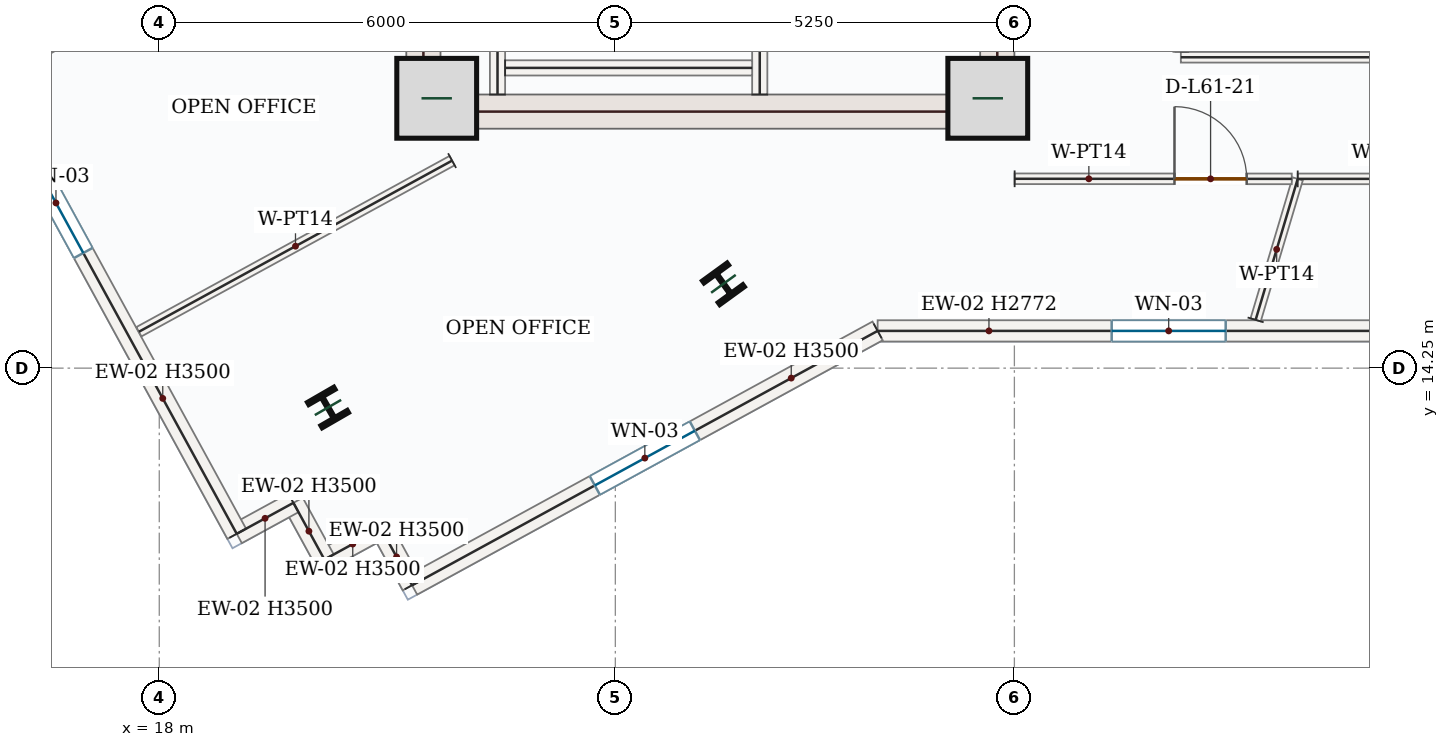
"""IFC4 building model, lengths in metres.
Left out: names, types, materials, properties, quantities, classifications, styles, units other than length and angle.
Written with IfcOpenShell. Run it as: python <this file> out.ifc"""

import sys

from ifc_helpers import new_model, si_unit, direction, frame, frame_2d, origin, origin_2d, place, context, subcontext, project, spatial, rectangle, i_section, extrude, source, transform, mapped, element, fill, save


model = new_model("IFC4")
c1 = context("Model", 3, precision=1e-05, world=origin(), true_north=direction((0.0, 1.0)))
c2 = subcontext(c1, "Body", "Model", "MODEL_VIEW")
j1 = project(units=[si_unit("LENGTHUNIT", "METRE"), si_unit("PLANEANGLEUNIT", "RADIAN")], contexts=[c1])
p1 = place(None, origin())
s1 = spatial("IfcSite", under=j1, at=p1, CompositionType="ELEMENT")
p2 = place(p1, origin())
s2 = spatial("IfcBuilding", under=s1, at=p2, CompositionType="ELEMENT")
p3 = place(p2, frame((0.0, 0.0, 257.85)))
s3 = spatial("IfcBuildingStorey", under=s2, at=p3, CompositionType="ELEMENT", Elevation=257.85)
m1 = source(origin(), c2, "Body", "SweptSolid", [
    extrude(rectangle(XDim=8.55, YDim=0.45, at=frame_2d((4.275, 0.0))), origin(), (0.0, 0.0, 1.0), 3.5),
])
p4 = place(p3, frame((21.475, 17.4, 0.0), z_axis=(0.0, 0.0, 1.0), x_axis=(0.0, 1.0, 0.0)))
e1 = element("IfcWall", 1, at=p4, inside=s3, PredefinedType="SHEAR", context=c2, shape_type="MappedRepresentation", body=[
    mapped(m1, transform((0.0, 0.0, 0.0), x_axis=(1.0, 0.0, 0.0), y_axis=(0.0, 1.0, 0.0), z_axis=(0.0, 0.0, 1.0), scale=1.0)),
])
p5 = place(p3, frame((29.025, 17.4, 0.0), z_axis=(0.0, 0.0, 1.0), x_axis=(0.0, 1.0, 0.0)))
e2 = element("IfcWall", 2, at=p5, inside=s3, PredefinedType="SHEAR", context=c2, shape_type="SweptSolid", body=[
    extrude(rectangle(XDim=8.55, YDim=0.45, at=frame_2d((4.275, 0.0))), origin(), (0.0, 0.0, 1.0), 3.5),
])
p6 = place(p5, frame((6.65, 0.0, 0.0)))
e3 = element("IfcOpeningElement", 3, at=p6, cuts=e2, PredefinedType="OPENING", context=c2, shape_type="SweptSolid", body=[
    extrude(rectangle(XDim=1.1, YDim=2.2, at=frame_2d((0.55, 1.1))), frame((0.0, 0.235, 0.0), z_axis=(0.0, -1.0, 0.0), x_axis=(1.0, 0.0, 0.0)), (0.0, 0.0, 1.0), 0.47),
])
p7 = place(p5, frame((3.15, 0.0, 0.0)))
e4 = element("IfcOpeningElement", 4, at=p7, cuts=e2, PredefinedType="OPENING", context=c2, shape_type="SweptSolid", body=[
    extrude(rectangle(XDim=0.88, YDim=2.1, at=frame_2d((0.44, 1.05))), frame((0.0, 0.235, 0.0), z_axis=(0.0, -1.0, 0.0), x_axis=(1.0, 0.0, 0.0)), (0.0, 0.0, 1.0), 0.47),
])
m2 = source(origin(), c2, "Body", "SweptSolid", [
    extrude(rectangle(XDim=7.1, YDim=0.45, at=frame_2d((3.55, 0.0))), origin(), (0.0, 0.0, 1.0), 3.5),
])
p8 = place(p3, frame((21.7, 17.625, 0.0), z_axis=(0.0, 0.0, 1.0), x_axis=(1.0, 0.0, 0.0)))
e5 = element("IfcWall", 5, at=p8, inside=s3, PredefinedType="SHEAR", context=c2, shape_type="MappedRepresentation", body=[
    mapped(m2, transform((0.0, 0.0, 0.0), x_axis=(1.0, 0.0, 0.0), y_axis=(0.0, 1.0, 0.0), z_axis=(0.0, 0.0, 1.0), scale=1.0)),
])
m3 = source(origin(), c2, "Body", "SweptSolid", [
    extrude(rectangle(XDim=1.05, YDim=1.05, at=origin_2d()), origin(), (0.0, 0.0, 1.0), 3.75),
])
for number, where, z_axis, x_axis in (
    (6, (21.65, 17.8, 0.0), (0.0, 0.0, 1.0), (1.0, 0.0, 0.0)),
    (7, (28.9, 17.8, 0.0), (0.0, 0.0, 1.0), (1.0, 0.0, 0.0)),
):
    element("IfcColumn", number, at=place(p3, frame(where, z_axis=z_axis, x_axis=x_axis)), inside=s3, PredefinedType="COLUMN", context=c2, shape_type="MappedRepresentation", body=[
        mapped(m3, transform((0.0, 0.0, 0.0), x_axis=(1.0, 0.0, 0.0), y_axis=(0.0, 1.0, 0.0), z_axis=(0.0, 0.0, 1.0), scale=1.0)),
    ])
m4 = source(origin(), c2, "Body", "SweptSolid", [
    extrude(i_section(OverallWidth=0.399, OverallDepth=0.386, WebThickness=0.021, FlangeThickness=0.033, FilletRadius=0.018, at=origin_2d()), origin(), (0.0, 0.0, 1.0), 3.75),
])
for number, where, z_axis, x_axis in (
    (8, (25.422, 15.359, 0.0), (0.0, 0.0, 1.0), (0.809, 0.588, 0.0)),
    (9, (20.22, 13.732, 0.0), (0.0, 0.0, 1.0), (0.866, 0.5, 0.0)),
):
    element("IfcColumn", number, at=place(p3, frame(where, z_axis=z_axis, x_axis=x_axis)), inside=s3, PredefinedType="COLUMN", context=c2, shape_type="MappedRepresentation", body=[
        mapped(m4, transform((0.0, 0.0, 0.0), x_axis=(1.0, 0.0, 0.0), y_axis=(0.0, 1.0, 0.0), z_axis=(0.0, 0.0, 1.0), scale=1.0)),
    ])
p9 = place(p3, frame((35.109, 14.74, 0.0), z_axis=(0.0, 0.0, 1.0), x_axis=(-1.0, 0.0, 0.0)))
e10 = element("IfcWall", 10, at=p9, inside=s3, PredefinedType="SOLIDWALL", context=c2, shape_type="SweptSolid", body=[
    extrude(rectangle(XDim=7.658, YDim=0.28, at=frame_2d((3.829, 0.0))), origin(), (0.0, 0.0, 1.0), 2.772),
])
p10 = place(p9, frame((3.079, 0.0, 0.85)))
e11 = element("IfcOpeningElement", 11, at=p10, cuts=e10, PredefinedType="OPENING", context=c2, shape_type="SweptSolid", body=[
    extrude(rectangle(XDim=1.5, YDim=1.5, at=frame_2d((0.75, 0.75))), frame((0.0, 0.15, 0.0), z_axis=(0.0, -1.0, 0.0), x_axis=(1.0, 0.0, 0.0)), (0.0, 0.0, 1.0), 0.3),
])
p11 = place(p3, frame((27.451, 14.74, 0.0), z_axis=(0.0, 0.0, 1.0), x_axis=(-0.877569176667, -0.479450039279, 0.0)))
e12 = element("IfcWall", 12, at=p11, inside=s3, PredefinedType="SOLIDWALL", context=c2, shape_type="SweptSolid", body=[
    extrude(rectangle(XDim=6.979, YDim=0.28, at=frame_2d((3.49, 0.0))), origin(), (0.0, 0.0, 1.0), 3.5),
])
p12 = place(p11, frame((2.74, 0.0, 0.85)))
e13 = element("IfcOpeningElement", 13, at=p12, cuts=e12, PredefinedType="OPENING", context=c2, shape_type="SweptSolid", body=[
    extrude(rectangle(XDim=1.5, YDim=1.5, at=frame_2d((0.75, 0.75))), frame((0.0, 0.15, 0.0), z_axis=(0.0, -1.0, 0.0), x_axis=(1.0, 0.0, 0.0)), (0.0, 0.0, 1.0), 0.3),
])
m5 = source(origin(), c2, "Body", "SweptSolid", [
    extrude(rectangle(XDim=0.85, YDim=0.28, at=frame_2d((0.425, 0.0))), origin(), (0.0, 0.0, 1.0), 3.5),
])
for number, where, z_axis, x_axis in (
    (14, (21.326, 11.394, 0.0), (0.0, 0.0, 1.0), (-0.479, 0.878, 0.0)),
    (15, (20.918, 12.14, 0.0), (0.0, 0.0, 1.0), (-0.878, -0.479, 0.0)),
):
    element("IfcWall", number, at=place(p3, frame(where, z_axis=z_axis, x_axis=x_axis)), inside=s3, PredefinedType="SOLIDWALL", context=c2, shape_type="MappedRepresentation", body=[
        mapped(m5, transform((0.0, 0.0, 0.0), x_axis=(1.0, 0.0, 0.0), y_axis=(0.0, 1.0, 0.0), z_axis=(0.0, 0.0, 1.0), scale=1.0)),
    ])
m6 = source(origin(), c2, "Body", "SweptSolid", [
    extrude(rectangle(XDim=0.85, YDim=0.28, at=frame_2d((0.425, 0.0))), origin(), (0.0, 0.0, 1.0), 3.5),
])
p13 = place(p3, frame((20.173, 11.732, 0.0), z_axis=(0.0, 0.0, 1.0), x_axis=(-0.479656876283, 0.877456141943, 0.0)))
e16 = element("IfcWall", 16, at=p13, inside=s3, PredefinedType="SOLIDWALL", context=c2, shape_type="MappedRepresentation", body=[
    mapped(m6, transform((0.0, 0.0, 0.0), x_axis=(1.0, 0.0, 0.0), y_axis=(0.0, 1.0, 0.0), z_axis=(0.0, 0.0, 1.0), scale=1.0)),
])
p14 = place(p3, frame((19.765, 12.478, 0.0), z_axis=(0.0, 0.0, 1.0), x_axis=(-0.877577015132, -0.479435691737, 0.0)))
e17 = element("IfcWall", 17, at=p14, inside=s3, PredefinedType="SOLIDWALL", context=c2, shape_type="MappedRepresentation", body=[
    mapped(m5, transform((0.0, 0.0, 0.0), x_axis=(1.0, 0.0, 0.0), y_axis=(0.0, 1.0, 0.0), z_axis=(0.0, 0.0, 1.0), scale=1.0)),
])
p15 = place(p3, frame((19.019, 12.071, 0.0), z_axis=(0.0, 0.0, 1.0), x_axis=(-0.479472774144, 0.877556755347, 0.0)))
e18 = element("IfcWall", 18, at=p15, inside=s3, PredefinedType="SOLIDWALL", context=c2, shape_type="SweptSolid", body=[
    extrude(rectangle(XDim=9.92, YDim=0.28, at=frame_2d((4.96, 0.0))), origin(), (0.0, 0.0, 1.0), 3.5),
])
p16 = place(p15, frame((4.21, 0.0, 0.85)))
e19 = element("IfcOpeningElement", 19, at=p16, cuts=e18, PredefinedType="OPENING", context=c2, shape_type="SweptSolid", body=[
    extrude(rectangle(XDim=1.5, YDim=1.5, at=frame_2d((0.75, 0.75))), frame((0.0, 0.15, 0.0), z_axis=(0.0, -1.0, 0.0), x_axis=(1.0, 0.0, 0.0)), (0.0, 0.0, 1.0), 0.3),
])
m7 = source(origin(), c2, "Body", "SweptSolid", [
    extrude(rectangle(XDim=7.87, YDim=0.2, at=frame_2d((3.935, 0.0))), origin(), (0.0, 0.0, 1.0), 3.5),
])
p17 = place(p3, frame((22.45, 17.85, 0.0), z_axis=(0.0, 0.0, 1.0), x_axis=(0.0, 1.0, 0.0)))
e20 = element("IfcWall", 20, at=p17, inside=s3, PredefinedType="SOLIDWALL", context=c2, shape_type="MappedRepresentation", body=[
    mapped(m7, transform((0.0, 0.0, 0.0), x_axis=(1.0, 0.0, 0.0), y_axis=(0.0, 1.0, 0.0), z_axis=(0.0, 0.0, 1.0), scale=1.0)),
])
p18 = place(p3, frame((25.9, 17.85, 0.0), z_axis=(0.0, 0.0, 1.0), x_axis=(0.0, 1.0, 0.0)))
e21 = element("IfcWall", 21, at=p18, inside=s3, PredefinedType="SOLIDWALL", context=c2, shape_type="SweptSolid", body=[
    extrude(rectangle(XDim=8.0, YDim=0.2, at=frame_2d((4.0, 0.0))), origin(), (0.0, 0.0, 1.0), 3.5),
])
p19 = place(p18, frame((6.2, 0.0, 0.0)))
e22 = element("IfcOpeningElement", 22, at=p19, cuts=e21, PredefinedType="OPENING", context=c2, shape_type="SweptSolid", body=[
    extrude(rectangle(XDim=1.0, YDim=2.15, at=frame_2d((0.5, 1.075))), frame((0.0, 0.11, 0.0), z_axis=(0.0, -1.0, 0.0), x_axis=(1.0, 0.0, 0.0)), (0.0, 0.0, 1.0), 0.22),
])
p20 = place(p18, frame((0.6, 0.0, 0.0)))
e23 = element("IfcOpeningElement", 23, at=p20, cuts=e21, PredefinedType="OPENING", context=c2, shape_type="SweptSolid", body=[
    extrude(rectangle(XDim=0.88, YDim=2.1, at=frame_2d((0.44, 1.05))), frame((0.0, 0.11, 0.0), z_axis=(0.0, -1.0, 0.0), x_axis=(1.0, 0.0, 0.0)), (0.0, 0.0, 1.0), 0.22),
])
m8 = source(origin(), c2, "Body", "SweptSolid", [
    extrude(rectangle(XDim=3.25, YDim=0.2, at=frame_2d((1.625, 0.0))), origin(), (0.0, 0.0, 1.0), 3.5),
])
p21 = place(p3, frame((22.55, 18.2, 0.0), z_axis=(0.0, 0.0, 1.0), x_axis=(1.0, 0.0, 0.0)))
e24 = element("IfcWall", 24, at=p21, inside=s3, PredefinedType="SOLIDWALL", context=c2, shape_type="MappedRepresentation", body=[
    mapped(m8, transform((0.0, 0.0, 0.0), x_axis=(1.0, 0.0, 0.0), y_axis=(0.0, 1.0, 0.0), z_axis=(0.0, 0.0, 1.0), scale=1.0)),
])
m9 = source(origin(), c2, "Body", "SweptSolid", [
    extrude(rectangle(XDim=4.695, YDim=0.14, at=frame_2d((2.348, 0.0))), origin(), (0.0, 0.0, 1.0), 3.5),
])
p22 = place(p3, frame((21.852, 16.98, 0.0), z_axis=(0.0, 0.0, 1.0), x_axis=(-0.877559526902, -0.479467701461, 0.0)))
e25 = element("IfcWall", 25, at=p22, inside=s3, PredefinedType="PARTITIONING", context=c2, shape_type="MappedRepresentation", body=[
    mapped(m9, transform((0.0, 0.0, 0.0), x_axis=(1.0, 0.0, 0.0), y_axis=(0.0, 1.0, 0.0), z_axis=(0.0, 0.0, 1.0), scale=1.0)),
])
p23 = place(p3, frame((15.891, 18.099, 0.0), z_axis=(0.0, 0.0, 1.0), x_axis=(0.877574248726, 0.479440755436, 0.0)))
e26 = element("IfcWall", 26, at=p23, inside=s3, PredefinedType="PARTITIONING", context=c2, shape_type="SweptSolid", body=[
    extrude(rectangle(XDim=6.102, YDim=0.14, at=frame_2d((3.051, 0.0))), origin(), (0.0, 0.0, 1.0), 3.5),
])
p24 = place(p23, frame((4.018, 0.0, 0.0)))
e27 = element("IfcOpeningElement", 27, at=p24, cuts=e26, PredefinedType="OPENING", context=c2, shape_type="SweptSolid", body=[
    extrude(rectangle(XDim=0.95, YDim=2.15, at=frame_2d((0.475, 1.075))), frame((0.0, 0.08, 0.0), z_axis=(0.0, -1.0, 0.0), x_axis=(1.0, 0.0, 0.0)), (0.0, 0.0, 1.0), 0.16),
])
p25 = place(p3, frame((32.978, 16.74, 0.0), z_axis=(0.0, 0.0, 1.0), x_axis=(1.0, 0.0, 0.0)))
e28 = element("IfcWall", 28, at=p25, inside=s3, PredefinedType="PARTITIONING", context=c2, shape_type="SweptSolid", body=[
    extrude(rectangle(XDim=4.879, YDim=0.14, at=frame_2d((2.439, 0.0))), origin(), (0.0, 0.0, 1.0), 3.5),
])
p26 = place(p25, frame((2.554, 0.0, 0.0)))
e29 = element("IfcOpeningElement", 29, at=p26, cuts=e28, PredefinedType="OPENING", context=c2, shape_type="SweptSolid", body=[
    extrude(rectangle(XDim=0.95, YDim=2.15, at=frame_2d((0.475, 1.075))), frame((0.0, 0.08, 0.0), z_axis=(0.0, -1.0, 0.0), x_axis=(1.0, 0.0, 0.0)), (0.0, 0.0, 1.0), 0.16),
])
m10 = source(origin(), c2, "Body", "SweptSolid", [
    extrude(rectangle(XDim=1.936, YDim=0.14, at=frame_2d((0.968, 0.0))), origin(), (0.0, 0.0, 1.0), 3.5),
])
p27 = place(p3, frame((32.424, 14.885, 0.0), z_axis=(0.0, 0.0, 1.0), x_axis=(0.286028613148, 0.958221077028, 0.0)))
e30 = element("IfcWall", 30, at=p27, inside=s3, PredefinedType="PARTITIONING", context=c2, shape_type="MappedRepresentation", body=[
    mapped(m10, transform((0.0, 0.0, 0.0), x_axis=(1.0, 0.0, 0.0), y_axis=(0.0, 1.0, 0.0), z_axis=(0.0, 0.0, 1.0), scale=1.0)),
])
p28 = place(p3, frame((29.253, 16.741, 0.0), z_axis=(0.0, 0.0, 1.0), x_axis=(0.999999943952, -0.000334806463, 0.0)))
e31 = element("IfcWall", 31, at=p28, inside=s3, PredefinedType="PARTITIONING", context=c2, shape_type="SweptSolid", body=[
    extrude(rectangle(XDim=3.646, YDim=0.14, at=frame_2d((1.823, 0.0))), origin(), (0.0, 0.0, 1.0), 3.5),
])
p29 = place(p28, frame((2.103, 0.0, 0.0)))
e32 = element("IfcOpeningElement", 32, at=p29, cuts=e31, PredefinedType="OPENING", context=c2, shape_type="SweptSolid", body=[
    extrude(rectangle(XDim=0.95, YDim=2.15, at=frame_2d((0.475, 1.075))), frame((0.0, 0.08, 0.0), z_axis=(0.0, -1.0, 0.0), x_axis=(1.0, 0.0, 0.0)), (0.0, 0.0, 1.0), 0.16),
])
m11 = source(origin(), c2, "Body", "SweptSolid", [
    extrude(rectangle(XDim=9.12, YDim=0.14, at=frame_2d((4.56, 0.0))), origin(), (0.0, 0.0, 1.0), 3.5),
])
p30 = place(p3, frame((40.56, 18.34, 0.0), z_axis=(0.0, 0.0, 1.0), x_axis=(-1.0, 0.0, 0.0)))
e33 = element("IfcWall", 33, at=p30, inside=s3, PredefinedType="PARTITIONING", context=c2, shape_type="MappedRepresentation", body=[
    mapped(m11, transform((0.0, 0.0, 0.0), x_axis=(1.0, 0.0, 0.0), y_axis=(0.0, 1.0, 0.0), z_axis=(0.0, 0.0, 1.0), scale=1.0)),
])
m12 = source(origin(), c2, "Body", "SweptSolid", [
    extrude(rectangle(XDim=1.5, YDim=1.5, at=frame_2d((0.75, 0.75))), frame((0.0, 0.03, 0.0), z_axis=(0.0, -1.0, 0.0), x_axis=(1.0, 0.0, 0.0)), (0.0, 0.0, 1.0), 0.06),
])
p31 = place(p10, origin())
e34 = element("IfcWindow", 34, at=p31, inside=s3, PartitioningType="SINGLE_PANEL", PredefinedType="WINDOW", context=c2, shape_type="MappedRepresentation", body=[
    mapped(m12, transform((0.0, 0.0, 0.0), x_axis=(1.0, 0.0, 0.0), y_axis=(0.0, 1.0, 0.0), z_axis=(0.0, 0.0, 1.0), scale=1.0)),
])
fill(e11, e34)
p32 = place(p12, origin())
e35 = element("IfcWindow", 35, at=p32, inside=s3, PartitioningType="SINGLE_PANEL", PredefinedType="WINDOW", context=c2, shape_type="MappedRepresentation", body=[
    mapped(m12, transform((0.0, 0.0, 0.0), x_axis=(1.0, 0.0, 0.0), y_axis=(0.0, 1.0, 0.0), z_axis=(0.0, 0.0, 1.0), scale=1.0)),
])
fill(e13, e35)
p33 = place(p16, origin())
e36 = element("IfcWindow", 36, at=p33, inside=s3, PartitioningType="SINGLE_PANEL", PredefinedType="WINDOW", context=c2, shape_type="MappedRepresentation", body=[
    mapped(m12, transform((0.0, 0.0, 0.0), x_axis=(1.0, 0.0, 0.0), y_axis=(0.0, 1.0, 0.0), z_axis=(0.0, 0.0, 1.0), scale=1.0)),
])
fill(e19, e36)
m13 = source(origin(), c2, "Body", "SweptSolid", [
    extrude(rectangle(XDim=0.95, YDim=2.15, at=frame_2d((0.475, 1.075))), frame((0.0, 0.025, 0.0), z_axis=(0.0, -1.0, 0.0), x_axis=(1.0, 0.0, 0.0)), (0.0, 0.0, 1.0), 0.05),
])
p34 = place(p29, origin())
e37 = element("IfcDoor", 37, at=p34, inside=s3, OperationType="SINGLE_SWING_LEFT", PredefinedType="DOOR", context=c2, shape_type="MappedRepresentation", body=[
    mapped(m13, transform((0.0, 0.0, 0.0), x_axis=(1.0, 0.0, 0.0), y_axis=(0.0, 1.0, 0.0), z_axis=(0.0, 0.0, 1.0), scale=1.0)),
])
fill(e32, e37)
save(model, sys.argv[1])
